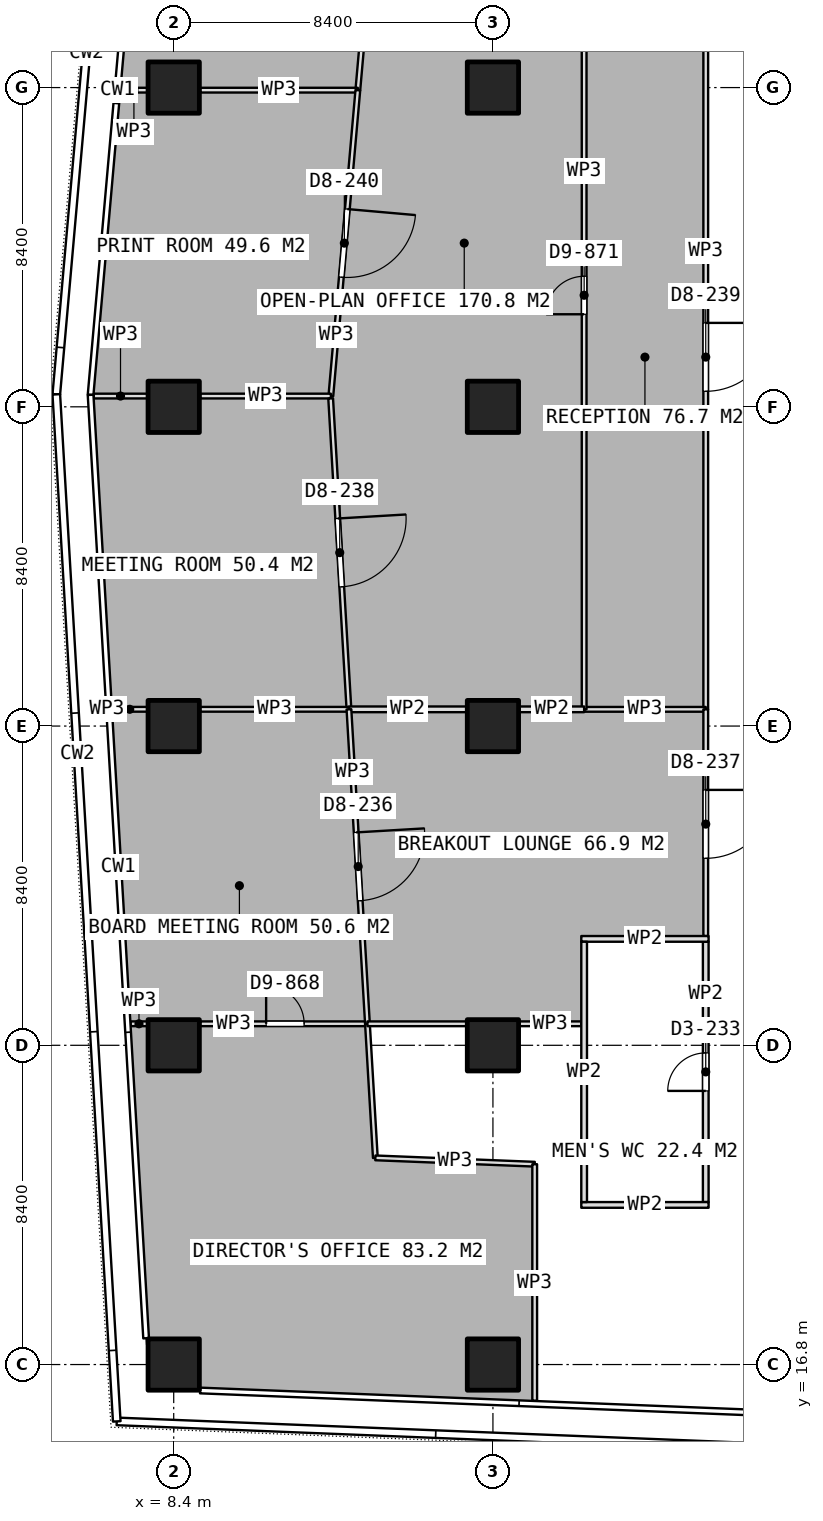
"""IFC4 building model, lengths in metres.
Left out: names, types, materials, properties, quantities, classifications, styles, units other than length and angle.
Written with IfcOpenShell. Run it as: python <this file> out.ifc"""

import sys

from ifc_helpers import new_model, si_unit, direction, frame, frame_2d, origin, origin_2d, place, context, subcontext, project, spatial, rectangle, extrude, element, fill, save


model = new_model("IFC4")
c1 = context("Model", 3, precision=1e-05, world=origin(), true_north=direction((0.0, 1.0)))
c2 = subcontext(c1, "Body", "Model", "MODEL_VIEW")
j1 = project(units=[si_unit("LENGTHUNIT", "METRE"), si_unit("PLANEANGLEUNIT", "RADIAN")], contexts=[c1])
p1 = place(None, origin())
s1 = spatial("IfcSite", under=j1, at=p1, CompositionType="ELEMENT")
p2 = place(p1, origin())
s2 = spatial("IfcBuilding", under=s1, at=p2, CompositionType="ELEMENT")
p3 = place(p2, frame((0.0, 0.0, 217.7)))
s3 = spatial("IfcBuildingStorey", under=s2, at=p3, CompositionType="ELEMENT", Elevation=217.7)
for number, where, z_axis, x_axis in (
    (1, (8.4, 16.8, 0.0), (0.0, 0.0, 1.0), (1.0, 0.0, 0.0)),
    (2, (8.4, 25.2, 0.0), (0.0, 0.0, 1.0), (1.0, 0.0, 0.0)),
    (3, (8.4, 33.6, 0.0), (0.0, 0.0, 1.0), (1.0, 0.0, 0.0)),
    (4, (8.4, 42.0, 0.0), (0.0, 0.0, 1.0), (1.0, 0.0, 0.0)),
    (5, (8.4, 50.4, 0.0), (0.0, 0.0, 1.0), (1.0, 0.0, 0.0)),
    (6, (16.8, 16.8, 0.0), (0.0, 0.0, 1.0), (1.0, 0.0, 0.0)),
    (7, (16.8, 25.2, 0.0), (0.0, 0.0, 1.0), (1.0, 0.0, 0.0)),
    (8, (16.8, 33.6, 0.0), (0.0, 0.0, 1.0), (1.0, 0.0, 0.0)),
    (9, (16.8, 42.0, 0.0), (0.0, 0.0, 1.0), (1.0, 0.0, 0.0)),
    (10, (16.8, 50.4, 0.0), (0.0, 0.0, 1.0), (1.0, 0.0, 0.0)),
):
    element("IfcColumn", number, at=place(p3, frame(where, z_axis=z_axis, x_axis=x_axis)), inside=s3, PredefinedType="COLUMN", context=c2, shape_type="SweptSolid", body=[
        extrude(rectangle(XDim=1.35, YDim=1.35, at=origin_2d()), origin(), (0.0, 0.0, 1.0), 3.75),
    ])
for number, where, z_axis, x_axis in (
    (11, (19.125, 21.0, 0.0), (0.0, 0.0, 1.0), (1.0, 0.0, 0.0)),
    (12, (19.125, 28.0, 0.0), (0.0, 0.0, 1.0), (1.0, 0.0, 0.0)),
):
    element("IfcWall", number, at=place(p3, frame(where, z_axis=z_axis, x_axis=x_axis)), inside=s3, PredefinedType="PARTITIONING", context=c2, shape_type="SweptSolid", body=[
        extrude(rectangle(XDim=3.35, YDim=0.15, at=frame_2d((1.675, 0.0))), origin(), (0.0, 0.0, 1.0), 3.5),
    ])
p4 = place(p3, frame((19.2, 21.075, 0.0), z_axis=(0.0, 0.0, 1.0), x_axis=(0.0, 1.0, 0.0)))
e13 = element("IfcWall", 13, at=p4, inside=s3, PredefinedType="PARTITIONING", context=c2, shape_type="SweptSolid", body=[
    extrude(rectangle(XDim=6.85, YDim=0.15, at=frame_2d((3.425, 0.0))), origin(), (0.0, 0.0, 1.0), 3.5),
])
p5 = place(p3, frame((22.4, 21.075, 0.0), z_axis=(0.0, 0.0, 1.0), x_axis=(0.0, 1.0, 0.0)))
e14 = element("IfcWall", 14, at=p5, inside=s3, PredefinedType="PARTITIONING", context=c2, shape_type="SweptSolid", body=[
    extrude(rectangle(XDim=6.85, YDim=0.15, at=frame_2d((3.425, 0.0))), origin(), (0.0, 0.0, 1.0), 3.5),
])
p6 = place(p5, frame((2.925, 0.0, 0.0)))
e15 = element("IfcOpeningElement", 15, at=p6, cuts=e14, PredefinedType="OPENING", context=c2, shape_type="SweptSolid", body=[
    extrude(rectangle(XDim=1.0, YDim=2.1, at=frame_2d((0.5, 1.05))), frame((0.0, 0.085, 0.0), z_axis=(0.0, -1.0, 0.0), x_axis=(1.0, 0.0, 0.0)), (0.0, 0.0, 1.0), 0.17),
])
p7 = place(p3, frame((13.593, 54.27, 0.0), z_axis=(0.0, 0.0, 1.0), x_axis=(-0.088001948608, -0.996120302494, 0.0)))
e16 = element("IfcWall", 16, at=p7, inside=s3, PredefinedType="PARTITIONING", context=c2, shape_type="SweptSolid", body=[
    extrude(rectangle(XDim=3.953, YDim=0.125, at=frame_2d((1.977, 0.0))), origin(), (0.0, 0.0, 1.0), 3.5),
])
p8 = place(p3, frame((13.245, 50.332, 0.0), z_axis=(0.0, 0.0, 1.0), x_axis=(-1.0, 0.0, 0.0)))
e17 = element("IfcWall", 17, at=p8, inside=s3, PredefinedType="PARTITIONING", context=c2, shape_type="SweptSolid", body=[
    extrude(rectangle(XDim=4.15, YDim=0.125, at=frame_2d((2.075, 0.0))), origin(), (0.0, 0.0, 1.0), 3.5),
])
p9 = place(p3, frame((7.705, 50.332, 0.0), z_axis=(0.0, 0.0, 1.0), x_axis=(-1.0, 0.0, 0.0)))
e18 = element("IfcWall", 18, at=p9, inside=s3, PredefinedType="PARTITIONING", context=c2, shape_type="SweptSolid", body=[
    extrude(rectangle(XDim=0.704, YDim=0.125, at=frame_2d((0.352, 0.0))), origin(), (0.0, 0.0, 1.0), 3.5),
])
p10 = place(p3, frame((13.245, 50.331, 0.0), z_axis=(0.0, 0.0, 1.0), x_axis=(-0.087903511106, -0.996128994024, 0.0)))
e19 = element("IfcWall", 19, at=p10, inside=s3, PredefinedType="PARTITIONING", context=c2, shape_type="SweptSolid", body=[
    extrude(rectangle(XDim=8.079, YDim=0.125, at=frame_2d((4.04, 0.0))), origin(), (0.0, 0.0, 1.0), 3.5),
])
p11 = place(p10, frame((3.14, 0.0, 0.0)))
e20 = element("IfcOpeningElement", 20, at=p11, cuts=e19, PredefinedType="OPENING", context=c2, shape_type="SweptSolid", body=[
    extrude(rectangle(XDim=1.8, YDim=2.1, at=frame_2d((0.9, 1.05))), frame((0.0, 0.073, 0.0), z_axis=(0.0, -1.0, 0.0), x_axis=(1.0, 0.0, 0.0)), (0.0, 0.0, 1.0), 0.145),
])
p12 = place(p3, frame((12.535, 42.283, 0.0), z_axis=(0.0, 0.0, 1.0), x_axis=(-1.0, 0.0, 0.0)))
e21 = element("IfcWall", 21, at=p12, inside=s3, PredefinedType="PARTITIONING", context=c2, shape_type="SweptSolid", body=[
    extrude(rectangle(XDim=3.44, YDim=0.125, at=frame_2d((1.72, 0.0))), origin(), (0.0, 0.0, 1.0), 3.5),
])
p13 = place(p3, frame((7.705, 42.283, 0.0), z_axis=(0.0, 0.0, 1.0), x_axis=(-1.0, 0.0, 0.0)))
e22 = element("IfcWall", 22, at=p13, inside=s3, PredefinedType="PARTITIONING", context=c2, shape_type="SweptSolid", body=[
    extrude(rectangle(XDim=1.41, YDim=0.125, at=frame_2d((0.705, 0.0))), origin(), (0.0, 0.0, 1.0), 3.5),
])
p14 = place(p3, frame((12.53, 42.221, 0.0), z_axis=(0.0, 0.0, 1.0), x_axis=(0.058695823025, -0.998275913943, 0.0)))
e23 = element("IfcWall", 23, at=p14, inside=s3, PredefinedType="PARTITIONING", context=c2, shape_type="SweptSolid", body=[
    extrude(rectangle(XDim=8.194, YDim=0.125, at=frame_2d((4.097, 0.0))), origin(), (0.0, 0.0, 1.0), 3.5),
])
p15 = place(p14, frame((3.165, 0.0, 0.0)))
e24 = element("IfcOpeningElement", 24, at=p15, cuts=e23, PredefinedType="OPENING", context=c2, shape_type="SweptSolid", body=[
    extrude(rectangle(XDim=1.8, YDim=2.1, at=frame_2d((0.9, 1.05))), frame((0.0, 0.073, 0.0), z_axis=(0.0, -1.0, 0.0), x_axis=(1.0, 0.0, 0.0)), (0.0, 0.0, 1.0), 0.145),
])
p16 = place(p3, frame((13.011, 34.041, 0.0), z_axis=(0.0, 0.0, 1.0), x_axis=(-1.0, 0.0, 0.0)))
e25 = element("IfcWall", 25, at=p16, inside=s3, PredefinedType="PARTITIONING", context=c2, shape_type="SweptSolid", body=[
    extrude(rectangle(XDim=3.916, YDim=0.125, at=frame_2d((1.958, 0.0))), origin(), (0.0, 0.0, 1.0), 3.5),
])
p17 = place(p3, frame((7.705, 34.041, 0.0), z_axis=(0.0, 0.0, 1.0), x_axis=(-1.0, 0.0, 0.0)))
e26 = element("IfcWall", 26, at=p17, inside=s3, PredefinedType="PARTITIONING", context=c2, shape_type="SweptSolid", body=[
    extrude(rectangle(XDim=0.925, YDim=0.125, at=frame_2d((0.462, 0.0))), origin(), (0.0, 0.0, 1.0), 3.5),
])
p18 = place(p3, frame((7.267, 25.766, 0.0), z_axis=(0.0, 0.0, 1.0), x_axis=(1.0, 0.0, 0.0)))
e27 = element("IfcWall", 27, at=p18, inside=s3, PredefinedType="PARTITIONING", context=c2, shape_type="SweptSolid", body=[
    extrude(rectangle(XDim=0.438, YDim=0.125, at=frame_2d((0.219, 0.0))), origin(), (0.0, 0.0, 1.0), 3.5),
])
p19 = place(p3, frame((9.095, 25.766, 0.0), z_axis=(0.0, 0.0, 1.0), x_axis=(1.0, 0.0, 0.0)))
e28 = element("IfcWall", 28, at=p19, inside=s3, PredefinedType="PARTITIONING", context=c2, shape_type="SweptSolid", body=[
    extrude(rectangle(XDim=4.403, YDim=0.125, at=frame_2d((2.202, 0.0))), origin(), (0.0, 0.0, 1.0), 3.5),
])
p20 = place(p19, frame((1.737, 0.0, 0.0)))
e29 = element("IfcOpeningElement", 29, at=p20, cuts=e28, PredefinedType="OPENING", context=c2, shape_type="SweptSolid", body=[
    extrude(rectangle(XDim=1.0, YDim=2.1, at=frame_2d((0.5, 1.05))), frame((0.0, 0.073, 0.0), z_axis=(0.0, -1.0, 0.0), x_axis=(1.0, 0.0, 0.0)), (0.0, 0.0, 1.0), 0.145),
])
p21 = place(p3, frame((13.498, 25.766, 0.0), z_axis=(0.0, 0.0, 1.0), x_axis=(0.058855654346, -0.998266503471, 0.0)))
e30 = element("IfcWall", 30, at=p21, inside=s3, PredefinedType="PARTITIONING", context=c2, shape_type="SweptSolid", body=[
    extrude(rectangle(XDim=3.534, YDim=0.125, at=frame_2d((1.767, 0.0))), origin(), (0.0, 0.0, 1.0), 3.5),
])
p22 = place(p3, frame((13.706, 22.238, 0.0), z_axis=(0.0, 0.0, 1.0), x_axis=(0.999207821605, -0.039796095841, 0.0)))
e31 = element("IfcWall", 31, at=p22, inside=s3, PredefinedType="PARTITIONING", context=c2, shape_type="SweptSolid", body=[
    extrude(rectangle(XDim=4.196, YDim=0.125, at=frame_2d((2.098, 0.0))), origin(), (0.0, 0.0, 1.0), 3.5),
])
p23 = place(p3, frame((17.899, 22.071, 0.0), z_axis=(0.0, 0.0, 1.0), x_axis=(0.0, -1.0, 0.0)))
e32 = element("IfcWall", 32, at=p23, inside=s3, PredefinedType="PARTITIONING", context=c2, shape_type="SweptSolid", body=[
    extrude(rectangle(XDim=6.225, YDim=0.125, at=frame_2d((3.113, 0.0))), origin(), (0.0, 0.0, 1.0), 3.5),
])
p24 = place(p3, frame((22.4, 52.575, 0.0), z_axis=(0.0, 0.0, 1.0), x_axis=(0.0, -1.0, 0.0)))
e33 = element("IfcWall", 33, at=p24, inside=s3, PredefinedType="PARTITIONING", context=c2, shape_type="SweptSolid", body=[
    extrude(rectangle(XDim=18.535, YDim=0.125, at=frame_2d((9.268, 0.0))), origin(), (0.0, 0.0, 1.0), 3.5),
])
p25 = place(p24, frame((8.367, 0.0, 0.0)))
e34 = element("IfcOpeningElement", 34, at=p25, cuts=e33, PredefinedType="OPENING", context=c2, shape_type="SweptSolid", body=[
    extrude(rectangle(XDim=1.8, YDim=2.1, at=frame_2d((0.9, 1.05))), frame((0.0, 0.073, 0.0), z_axis=(0.0, -1.0, 0.0), x_axis=(1.0, 0.0, 0.0)), (0.0, 0.0, 1.0), 0.145),
])
p26 = place(p3, frame((22.4, 34.04, 0.0), z_axis=(0.0, 0.0, 1.0), x_axis=(-1.0, 0.0, 0.0)))
e35 = element("IfcWall", 35, at=p26, inside=s3, PredefinedType="PARTITIONING", context=c2, shape_type="SweptSolid", body=[
    extrude(rectangle(XDim=3.2, YDim=0.125, at=frame_2d((1.6, 0.0))), origin(), (0.0, 0.0, 1.0), 3.5),
])
p27 = place(p3, frame((19.2, 34.04, 0.0), z_axis=(0.0, 0.0, 1.0), x_axis=(0.0, 1.0, 0.0)))
e36 = element("IfcWall", 36, at=p27, inside=s3, PredefinedType="PARTITIONING", context=c2, shape_type="SweptSolid", body=[
    extrude(rectangle(XDim=21.789, YDim=0.125, at=frame_2d((10.895, 0.0))), origin(), (0.0, 0.0, 1.0), 3.5),
])
p28 = place(p27, frame((10.395, 0.0, 0.0)))
e37 = element("IfcOpeningElement", 37, at=p28, cuts=e36, PredefinedType="OPENING", context=c2, shape_type="SweptSolid", body=[
    extrude(rectangle(XDim=1.0, YDim=2.1, at=frame_2d((0.5, 1.05))), frame((0.0, 0.073, 0.0), z_axis=(0.0, -1.0, 0.0), x_axis=(1.0, 0.0, 0.0)), (0.0, 0.0, 1.0), 0.145),
])
p29 = place(p3, frame((19.2, 34.04, 0.0), z_axis=(0.0, 0.0, 1.0), x_axis=(-1.0, 0.0, 0.0)))
e38 = element("IfcWall", 38, at=p29, inside=s3, PredefinedType="PARTITIONING", context=c2, shape_type="SweptSolid", body=[
    extrude(rectangle(XDim=1.705, YDim=0.15, at=frame_2d((0.853, 0.0))), origin(), (0.0, 0.0, 1.0), 3.5),
])
p30 = place(p3, frame((16.105, 34.04, 0.0), z_axis=(0.0, 0.0, 1.0), x_axis=(-1.0, 0.0, 0.0)))
e39 = element("IfcWall", 39, at=p30, inside=s3, PredefinedType="PARTITIONING", context=c2, shape_type="SweptSolid", body=[
    extrude(rectangle(XDim=3.094, YDim=0.15, at=frame_2d((1.547, 0.0))), origin(), (0.0, 0.0, 1.0), 3.5),
])
p31 = place(p3, frame((13.011, 34.04, 0.0), z_axis=(0.0, 0.0, 1.0), x_axis=(0.058765190518, -0.998271832911, 0.0)))
e40 = element("IfcWall", 40, at=p31, inside=s3, PredefinedType="PARTITIONING", context=c2, shape_type="SweptSolid", body=[
    extrude(rectangle(XDim=8.288, YDim=0.125, at=frame_2d((4.144, 0.0))), origin(), (0.0, 0.0, 1.0), 3.5),
])
p32 = place(p31, frame((3.244, 0.0, 0.0)))
e41 = element("IfcOpeningElement", 41, at=p32, cuts=e40, PredefinedType="OPENING", context=c2, shape_type="SweptSolid", body=[
    extrude(rectangle(XDim=1.8, YDim=2.1, at=frame_2d((0.9, 1.05))), frame((0.0, 0.073, 0.0), z_axis=(0.0, -1.0, 0.0), x_axis=(1.0, 0.0, 0.0)), (0.0, 0.0, 1.0), 0.145),
])
p33 = place(p3, frame((19.125, 25.766, 0.0), z_axis=(0.0, 0.0, 1.0), x_axis=(-1.0, 0.0, 0.0)))
e42 = element("IfcWall", 42, at=p33, inside=s3, PredefinedType="PARTITIONING", context=c2, shape_type="SweptSolid", body=[
    extrude(rectangle(XDim=1.63, YDim=0.125, at=frame_2d((0.815, 0.0))), origin(), (0.0, 0.0, 1.0), 3.5),
])
p34 = place(p3, frame((16.105, 25.766, 0.0), z_axis=(0.0, 0.0, 1.0), x_axis=(-1.0, 0.0, 0.0)))
e43 = element("IfcWall", 43, at=p34, inside=s3, PredefinedType="PARTITIONING", context=c2, shape_type="SweptSolid", body=[
    extrude(rectangle(XDim=2.607, YDim=0.125, at=frame_2d((1.303, 0.0))), origin(), (0.0, 0.0, 1.0), 3.5),
])
p35 = place(p3, frame((22.4, 34.04, 0.0), z_axis=(0.0, 0.0, 1.0), x_axis=(0.0, -1.0, 0.0)))
e44 = element("IfcWall", 44, at=p35, inside=s3, PredefinedType="PARTITIONING", context=c2, shape_type="SweptSolid", body=[
    extrude(rectangle(XDim=5.965, YDim=0.125, at=frame_2d((2.982, 0.0))), origin(), (0.0, 0.0, 1.0), 3.5),
])
p36 = place(p35, frame((2.12, 0.0, 0.0)))
e45 = element("IfcOpeningElement", 45, at=p36, cuts=e44, PredefinedType="OPENING", context=c2, shape_type="SweptSolid", body=[
    extrude(rectangle(XDim=1.8, YDim=2.1, at=frame_2d((0.9, 1.05))), frame((0.0, 0.073, 0.0), z_axis=(0.0, -1.0, 0.0), x_axis=(1.0, 0.0, 0.0)), (0.0, 0.0, 1.0), 0.145),
])
p37 = place(p6, origin())
e46 = element("IfcDoor", 46, at=p37, inside=s3, OperationType="SINGLE_SWING_LEFT", PredefinedType="DOOR", context=c2, shape_type="SweptSolid", body=[
    extrude(rectangle(XDim=1.0, YDim=2.1, at=frame_2d((0.5, 1.05))), frame((0.0, 0.025, 0.0), z_axis=(0.0, -1.0, 0.0), x_axis=(1.0, 0.0, 0.0)), (0.0, 0.0, 1.0), 0.05),
])
fill(e15, e46)
p38 = place(p11, origin())
e47 = element("IfcDoor", 47, at=p38, inside=s3, OperationType="DOUBLE_DOOR_SINGLE_SWING", PredefinedType="DOOR", context=c2, shape_type="SweptSolid", body=[
    extrude(rectangle(XDim=1.8, YDim=2.1, at=frame_2d((0.9, 1.05))), frame((0.0, 0.025, 0.0), z_axis=(0.0, -1.0, 0.0), x_axis=(1.0, 0.0, 0.0)), (0.0, 0.0, 1.0), 0.05),
])
fill(e20, e47)
p39 = place(p15, origin())
e48 = element("IfcDoor", 48, at=p39, inside=s3, OperationType="DOUBLE_DOOR_SINGLE_SWING", PredefinedType="DOOR", context=c2, shape_type="SweptSolid", body=[
    extrude(rectangle(XDim=1.8, YDim=2.1, at=frame_2d((0.9, 1.05))), frame((0.0, 0.025, 0.0), z_axis=(0.0, -1.0, 0.0), x_axis=(1.0, 0.0, 0.0)), (0.0, 0.0, 1.0), 0.05),
])
fill(e24, e48)
p40 = place(p25, origin())
e49 = element("IfcDoor", 49, at=p40, inside=s3, OperationType="DOUBLE_DOOR_SINGLE_SWING", PredefinedType="DOOR", context=c2, shape_type="SweptSolid", body=[
    extrude(rectangle(XDim=1.8, YDim=2.1, at=frame_2d((0.9, 1.05))), frame((0.0, 0.025, 0.0), z_axis=(0.0, -1.0, 0.0), x_axis=(1.0, 0.0, 0.0)), (0.0, 0.0, 1.0), 0.05),
])
fill(e34, e49)
p41 = place(p36, origin())
e50 = element("IfcDoor", 50, at=p41, inside=s3, OperationType="DOUBLE_DOOR_SINGLE_SWING", PredefinedType="DOOR", context=c2, shape_type="SweptSolid", body=[
    extrude(rectangle(XDim=1.8, YDim=2.1, at=frame_2d((0.9, 1.05))), frame((0.0, 0.025, 0.0), z_axis=(0.0, -1.0, 0.0), x_axis=(1.0, 0.0, 0.0)), (0.0, 0.0, 1.0), 0.05),
])
fill(e45, e50)
p42 = place(p28, origin())
e51 = element("IfcDoor", 51, at=p42, inside=s3, OperationType="SINGLE_SWING_LEFT", PredefinedType="DOOR", context=c2, shape_type="SweptSolid", body=[
    extrude(rectangle(XDim=1.0, YDim=2.1, at=frame_2d((0.5, 1.05))), frame((0.0, 0.025, 0.0), z_axis=(0.0, -1.0, 0.0), x_axis=(1.0, 0.0, 0.0)), (0.0, 0.0, 1.0), 0.05),
])
fill(e37, e51)
p43 = place(p32, origin())
e52 = element("IfcDoor", 52, at=p43, inside=s3, OperationType="DOUBLE_DOOR_SINGLE_SWING", PredefinedType="DOOR", context=c2, shape_type="SweptSolid", body=[
    extrude(rectangle(XDim=1.8, YDim=2.1, at=frame_2d((0.9, 1.05))), frame((0.0, 0.025, 0.0), z_axis=(0.0, -1.0, 0.0), x_axis=(1.0, 0.0, 0.0)), (0.0, 0.0, 1.0), 0.05),
])
fill(e41, e52)
p44 = place(p20, origin())
e53 = element("IfcDoor", 53, at=p44, inside=s3, OperationType="SINGLE_SWING_LEFT", PredefinedType="DOOR", context=c2, shape_type="SweptSolid", body=[
    extrude(rectangle(XDim=1.0, YDim=2.1, at=frame_2d((0.5, 1.05))), frame((0.0, 0.025, 0.0), z_axis=(0.0, -1.0, 0.0), x_axis=(1.0, 0.0, 0.0)), (0.0, 0.0, 1.0), 0.05),
])
fill(e29, e53)
save(model, sys.argv[1])
